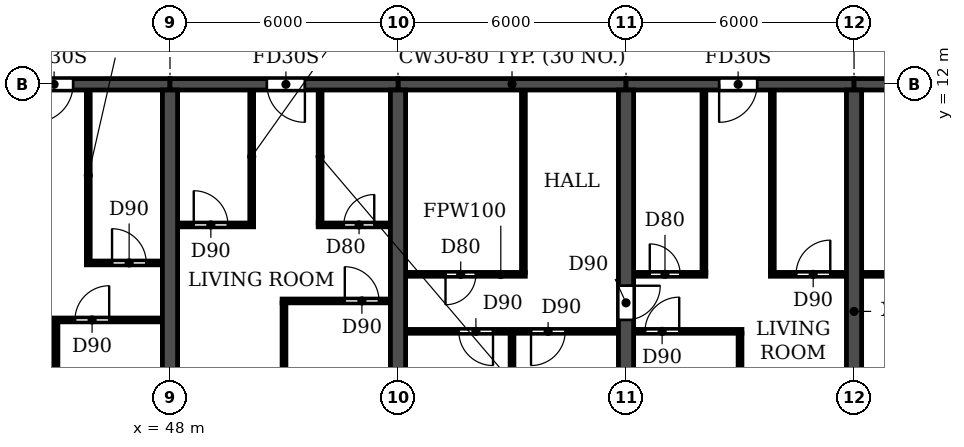
"""IFC4 building model, lengths in metres.
Left out: names, types, materials, properties, quantities, classifications, styles, units other than length and angle.
Written with IfcOpenShell. Run it as: python <this file> out.ifc"""

import sys

from ifc_helpers import new_model, si_unit, direction, frame, frame_2d, origin, place, context, subcontext, project, spatial, rectangle, extrude, element, fill, save


model = new_model("IFC4")
c1 = context("Model", 3, precision=1e-05, world=origin(), true_north=direction((0.0, 1.0)))
c2 = subcontext(c1, "Body", "Model", "MODEL_VIEW")
j1 = project(units=[si_unit("LENGTHUNIT", "METRE"), si_unit("PLANEANGLEUNIT", "RADIAN")], contexts=[c1])
p1 = place(None, origin())
s1 = spatial("IfcSite", under=j1, at=p1, CompositionType="ELEMENT")
p2 = place(p1, origin())
s2 = spatial("IfcBuilding", under=s1, at=p2, CompositionType="ELEMENT")
p3 = place(p2, frame((0.0, 0.0, 26.7)))
s3 = spatial("IfcBuildingStorey", under=s2, at=p3, CompositionType="ELEMENT", Elevation=26.7)
for number, where, z_axis, x_axis in (
    (1, (48.0, 0.2, 0.0), (0.0, 0.0, 1.0), (0.0, 1.0, 0.0)),
    (2, (54.0, 0.2, 0.0), (0.0, 0.0, 1.0), (0.0, 1.0, 0.0)),
):
    element("IfcWall", number, at=place(p3, frame(where, z_axis=z_axis, x_axis=x_axis)), inside=s3, PredefinedType="SHEAR", context=c2, shape_type="SweptSolid", body=[
        extrude(rectangle(XDim=11.65, YDim=0.4, at=frame_2d((5.825, 0.0))), origin(), (0.0, 0.0, 1.0), 3.05),
    ])
p4 = place(p3, frame((60.0, 0.2, 0.0), z_axis=(0.0, 0.0, 1.0), x_axis=(0.0, 1.0, 0.0)))
e3 = element("IfcWall", 3, at=p4, inside=s3, PredefinedType="SHEAR", context=c2, shape_type="SweptSolid", body=[
    extrude(rectangle(XDim=11.65, YDim=0.4, at=frame_2d((5.825, 0.0))), origin(), (0.0, 0.0, 1.0), 3.05),
])
p5 = place(p4, frame((5.6, 0.0, 0.0)))
e4 = element("IfcOpeningElement", 4, at=p5, cuts=e3, PredefinedType="OPENING", context=c2, shape_type="SweptSolid", body=[
    extrude(rectangle(XDim=0.9, YDim=2.1, at=frame_2d((0.45, 1.05))), frame((0.0, 0.21, 0.0), z_axis=(0.0, -1.0, 0.0), x_axis=(1.0, 0.0, 0.0)), (0.0, 0.0, 1.0), 0.42),
])
p6 = place(p3, frame((66.0, 0.2, 0.0), z_axis=(0.0, 0.0, 1.0), x_axis=(0.0, 1.0, 0.0)))
e5 = element("IfcWall", 5, at=p6, inside=s3, PredefinedType="SHEAR", context=c2, shape_type="SweptSolid", body=[
    extrude(rectangle(XDim=11.65, YDim=0.4, at=frame_2d((5.825, 0.0))), origin(), (0.0, 0.0, 1.0), 3.05),
])
p7 = place(p3, frame((42.0, 12.0, 0.0), z_axis=(0.0, 0.0, 1.0), x_axis=(1.0, 0.0, 0.0)))
e6 = element("IfcWall", 6, at=p7, inside=s3, PredefinedType="SHEAR", context=c2, shape_type="SweptSolid", body=[
    extrude(rectangle(XDim=6.0, YDim=0.3, at=frame_2d((3.0, 0.0))), origin(), (0.0, 0.0, 1.0), 2.45),
])
p8 = place(p7, frame((2.45, 0.0, 0.0)))
e7 = element("IfcOpeningElement", 7, at=p8, cuts=e6, PredefinedType="OPENING", context=c2, shape_type="SweptSolid", body=[
    extrude(rectangle(XDim=1.0, YDim=2.1, at=frame_2d((0.5, 1.05))), frame((0.0, 0.16, 0.0), z_axis=(0.0, -1.0, 0.0), x_axis=(1.0, 0.0, 0.0)), (0.0, 0.0, 1.0), 0.32),
])
p9 = place(p3, frame((48.0, 12.0, 0.0), z_axis=(0.0, 0.0, 1.0), x_axis=(1.0, 0.0, 0.0)))
e8 = element("IfcWall", 8, at=p9, inside=s3, PredefinedType="SHEAR", context=c2, shape_type="SweptSolid", body=[
    extrude(rectangle(XDim=6.0, YDim=0.3, at=frame_2d((3.0, 0.0))), origin(), (0.0, 0.0, 1.0), 2.45),
])
p10 = place(p9, frame((2.55, 0.0, 0.0)))
e9 = element("IfcOpeningElement", 9, at=p10, cuts=e8, PredefinedType="OPENING", context=c2, shape_type="SweptSolid", body=[
    extrude(rectangle(XDim=1.0, YDim=2.1, at=frame_2d((0.5, 1.05))), frame((0.0, 0.16, 0.0), z_axis=(0.0, -1.0, 0.0), x_axis=(1.0, 0.0, 0.0)), (0.0, 0.0, 1.0), 0.32),
])
p11 = place(p3, frame((54.0, 12.0, 0.0), z_axis=(0.0, 0.0, 1.0), x_axis=(1.0, 0.0, 0.0)))
e10 = element("IfcWall", 10, at=p11, inside=s3, PredefinedType="SHEAR", context=c2, shape_type="SweptSolid", body=[
    extrude(rectangle(XDim=6.0, YDim=0.3, at=frame_2d((3.0, 0.0))), origin(), (0.0, 0.0, 1.0), 2.45),
])
p12 = place(p3, frame((60.0, 12.0, 0.0), z_axis=(0.0, 0.0, 1.0), x_axis=(1.0, 0.0, 0.0)))
e11 = element("IfcWall", 11, at=p12, inside=s3, PredefinedType="SHEAR", context=c2, shape_type="SweptSolid", body=[
    extrude(rectangle(XDim=6.0, YDim=0.3, at=frame_2d((3.0, 0.0))), origin(), (0.0, 0.0, 1.0), 2.45),
])
p13 = place(p12, frame((2.45, 0.0, 0.0)))
e12 = element("IfcOpeningElement", 12, at=p13, cuts=e11, PredefinedType="OPENING", context=c2, shape_type="SweptSolid", body=[
    extrude(rectangle(XDim=1.0, YDim=2.1, at=frame_2d((0.5, 1.05))), frame((0.0, 0.16, 0.0), z_axis=(0.0, -1.0, 0.0), x_axis=(1.0, 0.0, 0.0)), (0.0, 0.0, 1.0), 0.32),
])
p14 = place(p3, frame((66.0, 12.0, 0.0), z_axis=(0.0, 0.0, 1.0), x_axis=(1.0, 0.0, 0.0)))
e13 = element("IfcWall", 13, at=p14, inside=s3, PredefinedType="SHEAR", context=c2, shape_type="SweptSolid", body=[
    extrude(rectangle(XDim=6.0, YDim=0.3, at=frame_2d((3.0, 0.0))), origin(), (0.0, 0.0, 1.0), 2.45),
])
p15 = place(p14, frame((2.45, 0.0, 0.0)))
e14 = element("IfcOpeningElement", 14, at=p15, cuts=e13, PredefinedType="OPENING", context=c2, shape_type="SweptSolid", body=[
    extrude(rectangle(XDim=1.0, YDim=2.1, at=frame_2d((0.5, 1.05))), frame((0.0, 0.16, 0.0), z_axis=(0.0, -1.0, 0.0), x_axis=(1.0, 0.0, 0.0)), (0.0, 0.0, 1.0), 0.32),
])
p16 = place(p3, frame((54.21, 5.5, 0.0), z_axis=(0.0, 0.0, 1.0), x_axis=(1.0, 0.0, 0.0)))
e15 = element("IfcWall", 15, at=p16, inside=s3, PredefinedType="PARTITIONING", context=c2, shape_type="SweptSolid", body=[
    extrude(rectangle(XDim=5.58, YDim=0.1, at=frame_2d((2.79, 0.0))), origin(), (0.0, 0.0, 1.0), 3.05),
])
p17 = place(p16, frame((1.39, 0.0, 0.0)))
e16 = element("IfcOpeningElement", 16, at=p17, cuts=e15, PredefinedType="OPENING", context=c2, shape_type="SweptSolid", body=[
    extrude(rectangle(XDim=0.9, YDim=2.1, at=frame_2d((0.45, 1.05))), frame((0.0, 0.06, 0.0), z_axis=(0.0, -1.0, 0.0), x_axis=(1.0, 0.0, 0.0)), (0.0, 0.0, 1.0), 0.12),
])
p18 = place(p16, frame((3.29, 0.0, 0.0)))
e17 = element("IfcOpeningElement", 17, at=p18, cuts=e15, PredefinedType="OPENING", context=c2, shape_type="SweptSolid", body=[
    extrude(rectangle(XDim=0.9, YDim=2.1, at=frame_2d((0.45, 1.05))), frame((0.0, 0.06, 0.0), z_axis=(0.0, -1.0, 0.0), x_axis=(1.0, 0.0, 0.0)), (0.0, 0.0, 1.0), 0.12),
])
p19 = place(p3, frame((60.21, 5.5, 0.0), z_axis=(0.0, 0.0, 1.0), x_axis=(1.0, 0.0, 0.0)))
e18 = element("IfcWall", 18, at=p19, inside=s3, PredefinedType="PARTITIONING", context=c2, shape_type="SweptSolid", body=[
    extrude(rectangle(XDim=2.84, YDim=0.1, at=frame_2d((1.42, 0.0))), origin(), (0.0, 0.0, 1.0), 3.05),
])
p20 = place(p19, frame((0.29, 0.0, 0.0)))
e19 = element("IfcOpeningElement", 19, at=p20, cuts=e18, PredefinedType="OPENING", context=c2, shape_type="SweptSolid", body=[
    extrude(rectangle(XDim=0.9, YDim=2.1, at=frame_2d((0.45, 1.05))), frame((0.0, 0.06, 0.0), z_axis=(0.0, -1.0, 0.0), x_axis=(1.0, 0.0, 0.0)), (0.0, 0.0, 1.0), 0.12),
])
p21 = place(p3, frame((44.95, 5.8, 0.0), z_axis=(0.0, 0.0, 1.0), x_axis=(1.0, 0.0, 0.0)))
e20 = element("IfcWall", 20, at=p21, inside=s3, PredefinedType="PARTITIONING", context=c2, shape_type="SweptSolid", body=[
    extrude(rectangle(XDim=2.84, YDim=0.1, at=frame_2d((1.42, 0.0))), origin(), (0.0, 0.0, 1.0), 3.05),
])
p22 = place(p21, frame((0.55, 0.0, 0.0)))
e21 = element("IfcOpeningElement", 21, at=p22, cuts=e20, PredefinedType="OPENING", context=c2, shape_type="SweptSolid", body=[
    extrude(rectangle(XDim=0.9, YDim=2.1, at=frame_2d((0.45, 1.05))), frame((0.0, 0.06, 0.0), z_axis=(0.0, -1.0, 0.0), x_axis=(1.0, 0.0, 0.0)), (0.0, 0.0, 1.0), 0.12),
])
p23 = place(p3, frame((50.95, 6.3, 0.0), z_axis=(0.0, 0.0, 1.0), x_axis=(1.0, 0.0, 0.0)))
e22 = element("IfcWall", 22, at=p23, inside=s3, PredefinedType="PARTITIONING", context=c2, shape_type="SweptSolid", body=[
    extrude(rectangle(XDim=2.84, YDim=0.1, at=frame_2d((1.42, 0.0))), origin(), (0.0, 0.0, 1.0), 3.05),
])
p24 = place(p23, frame((1.65, 0.0, 0.0)))
e23 = element("IfcOpeningElement", 23, at=p24, cuts=e22, PredefinedType="OPENING", context=c2, shape_type="SweptSolid", body=[
    extrude(rectangle(XDim=0.9, YDim=2.1, at=frame_2d((0.45, 1.05))), frame((0.0, 0.06, 0.0), z_axis=(0.0, -1.0, 0.0), x_axis=(1.0, 0.0, 0.0)), (0.0, 0.0, 1.0), 0.12),
])
p25 = place(p3, frame((54.21, 7.0, 0.0), z_axis=(0.0, 0.0, 1.0), x_axis=(1.0, 0.0, 0.0)))
e24 = element("IfcWall", 24, at=p25, inside=s3, PredefinedType="PARTITIONING", context=c2, shape_type="SweptSolid", body=[
    extrude(rectangle(XDim=3.14, YDim=0.1, at=frame_2d((1.57, 0.0))), origin(), (0.0, 0.0, 1.0), 3.05),
])
p26 = place(p25, frame((1.04, 0.0, 0.0)))
e25 = element("IfcOpeningElement", 25, at=p26, cuts=e24, PredefinedType="OPENING", context=c2, shape_type="SweptSolid", body=[
    extrude(rectangle(XDim=0.8, YDim=2.1, at=frame_2d((0.4, 1.05))), frame((0.0, 0.06, 0.0), z_axis=(0.0, -1.0, 0.0), x_axis=(1.0, 0.0, 0.0)), (0.0, 0.0, 1.0), 0.12),
])
p27 = place(p3, frame((60.21, 7.0, 0.0), z_axis=(0.0, 0.0, 1.0), x_axis=(1.0, 0.0, 0.0)))
e26 = element("IfcWall", 26, at=p27, inside=s3, PredefinedType="PARTITIONING", context=c2, shape_type="SweptSolid", body=[
    extrude(rectangle(XDim=1.89, YDim=0.1, at=frame_2d((0.945, 0.0))), origin(), (0.0, 0.0, 1.0), 3.05),
])
p28 = place(p27, frame((0.415, 0.0, 0.0)))
e27 = element("IfcOpeningElement", 27, at=p28, cuts=e26, PredefinedType="OPENING", context=c2, shape_type="SweptSolid", body=[
    extrude(rectangle(XDim=0.8, YDim=2.1, at=frame_2d((0.4, 1.05))), frame((0.0, 0.06, 0.0), z_axis=(0.0, -1.0, 0.0), x_axis=(1.0, 0.0, 0.0)), (0.0, 0.0, 1.0), 0.12),
])
p29 = place(p3, frame((63.8, 7.0, 0.0), z_axis=(0.0, 0.0, 1.0), x_axis=(1.0, 0.0, 0.0)))
e28 = element("IfcWall", 28, at=p29, inside=s3, PredefinedType="PARTITIONING", context=c2, shape_type="SweptSolid", body=[
    extrude(rectangle(XDim=1.99, YDim=0.1, at=frame_2d((0.995, 0.0))), origin(), (0.0, 0.0, 1.0), 3.05),
])
p30 = place(p29, frame((0.675, 0.0, 0.0)))
e29 = element("IfcOpeningElement", 29, at=p30, cuts=e28, PredefinedType="OPENING", context=c2, shape_type="SweptSolid", body=[
    extrude(rectangle(XDim=0.9, YDim=2.1, at=frame_2d((0.45, 1.05))), frame((0.0, 0.06, 0.0), z_axis=(0.0, -1.0, 0.0), x_axis=(1.0, 0.0, 0.0)), (0.0, 0.0, 1.0), 0.12),
])
p31 = place(p3, frame((66.21, 7.0, 0.0), z_axis=(0.0, 0.0, 1.0), x_axis=(1.0, 0.0, 0.0)))
e30 = element("IfcWall", 30, at=p31, inside=s3, PredefinedType="PARTITIONING", context=c2, shape_type="SweptSolid", body=[
    extrude(rectangle(XDim=1.89, YDim=0.1, at=frame_2d((0.945, 0.0))), origin(), (0.0, 0.0, 1.0), 3.05),
])
p32 = place(p3, frame((45.8, 7.3, 0.0), z_axis=(0.0, 0.0, 1.0), x_axis=(1.0, 0.0, 0.0)))
e31 = element("IfcWall", 31, at=p32, inside=s3, PredefinedType="PARTITIONING", context=c2, shape_type="SweptSolid", body=[
    extrude(rectangle(XDim=1.99, YDim=0.1, at=frame_2d((0.995, 0.0))), origin(), (0.0, 0.0, 1.0), 3.05),
])
p33 = place(p32, frame((0.675, 0.0, 0.0)))
e32 = element("IfcOpeningElement", 32, at=p33, cuts=e31, PredefinedType="OPENING", context=c2, shape_type="SweptSolid", body=[
    extrude(rectangle(XDim=0.9, YDim=2.1, at=frame_2d((0.45, 1.05))), frame((0.0, 0.06, 0.0), z_axis=(0.0, -1.0, 0.0), x_axis=(1.0, 0.0, 0.0)), (0.0, 0.0, 1.0), 0.12),
])
p34 = place(p3, frame((48.21, 8.3, 0.0), z_axis=(0.0, 0.0, 1.0), x_axis=(1.0, 0.0, 0.0)))
e33 = element("IfcWall", 33, at=p34, inside=s3, PredefinedType="PARTITIONING", context=c2, shape_type="SweptSolid", body=[
    extrude(rectangle(XDim=1.99, YDim=0.1, at=frame_2d((0.995, 0.0))), origin(), (0.0, 0.0, 1.0), 3.05),
])
p35 = place(p34, frame((0.415, 0.0, 0.0)))
e34 = element("IfcOpeningElement", 34, at=p35, cuts=e33, PredefinedType="OPENING", context=c2, shape_type="SweptSolid", body=[
    extrude(rectangle(XDim=0.9, YDim=2.1, at=frame_2d((0.45, 1.05))), frame((0.0, 0.06, 0.0), z_axis=(0.0, -1.0, 0.0), x_axis=(1.0, 0.0, 0.0)), (0.0, 0.0, 1.0), 0.12),
])
p36 = place(p3, frame((51.9, 8.3, 0.0), z_axis=(0.0, 0.0, 1.0), x_axis=(1.0, 0.0, 0.0)))
e35 = element("IfcWall", 35, at=p36, inside=s3, PredefinedType="PARTITIONING", context=c2, shape_type="SweptSolid", body=[
    extrude(rectangle(XDim=1.89, YDim=0.1, at=frame_2d((0.945, 0.0))), origin(), (0.0, 0.0, 1.0), 3.05),
])
p37 = place(p36, frame((0.675, 0.0, 0.0)))
e36 = element("IfcOpeningElement", 36, at=p37, cuts=e35, PredefinedType="OPENING", context=c2, shape_type="SweptSolid", body=[
    extrude(rectangle(XDim=0.8, YDim=2.1, at=frame_2d((0.4, 1.05))), frame((0.0, 0.06, 0.0), z_axis=(0.0, -1.0, 0.0), x_axis=(1.0, 0.0, 0.0)), (0.0, 0.0, 1.0), 0.12),
])
p38 = place(p3, frame((45.0, 0.06, 0.0), z_axis=(0.0, 0.0, 1.0), x_axis=(0.0, 1.0, 0.0)))
e37 = element("IfcWall", 37, at=p38, inside=s3, PredefinedType="PARTITIONING", context=c2, shape_type="SweptSolid", body=[
    extrude(rectangle(XDim=5.69, YDim=0.1, at=frame_2d((2.845, 0.0))), origin(), (0.0, 0.0, 1.0), 3.05),
])
p39 = place(p3, frame((45.85, 7.35, 0.0), z_axis=(0.0, 0.0, 1.0), x_axis=(0.0, 1.0, 0.0)))
e38 = element("IfcWall", 38, at=p39, inside=s3, PredefinedType="PARTITIONING", context=c2, shape_type="SweptSolid", body=[
    extrude(rectangle(XDim=4.49, YDim=0.1, at=frame_2d((2.245, 0.0))), origin(), (0.0, 0.0, 1.0), 3.05),
])
p40 = place(p3, frame((50.15, 8.35, 0.0), z_axis=(0.0, 0.0, 1.0), x_axis=(0.0, 1.0, 0.0)))
e39 = element("IfcWall", 39, at=p40, inside=s3, PredefinedType="PARTITIONING", context=c2, shape_type="SweptSolid", body=[
    extrude(rectangle(XDim=3.49, YDim=0.1, at=frame_2d((1.745, 0.0))), origin(), (0.0, 0.0, 1.0), 3.05),
])
p41 = place(p3, frame((51.0, 0.06, 0.0), z_axis=(0.0, 0.0, 1.0), x_axis=(0.0, 1.0, 0.0)))
e40 = element("IfcWall", 40, at=p41, inside=s3, PredefinedType="PARTITIONING", context=c2, shape_type="SweptSolid", body=[
    extrude(rectangle(XDim=6.19, YDim=0.1, at=frame_2d((3.095, 0.0))), origin(), (0.0, 0.0, 1.0), 3.05),
])
p42 = place(p3, frame((51.95, 8.35, 0.0), z_axis=(0.0, 0.0, 1.0), x_axis=(0.0, 1.0, 0.0)))
e41 = element("IfcWall", 41, at=p42, inside=s3, PredefinedType="PARTITIONING", context=c2, shape_type="SweptSolid", body=[
    extrude(rectangle(XDim=3.49, YDim=0.1, at=frame_2d((1.745, 0.0))), origin(), (0.0, 0.0, 1.0), 3.05),
])
p43 = place(p3, frame((57.0, 0.06, 0.0), z_axis=(0.0, 0.0, 1.0), x_axis=(0.0, 1.0, 0.0)))
e42 = element("IfcWall", 42, at=p43, inside=s3, PredefinedType="PARTITIONING", context=c2, shape_type="SweptSolid", body=[
    extrude(rectangle(XDim=5.39, YDim=0.1, at=frame_2d((2.695, 0.0))), origin(), (0.0, 0.0, 1.0), 3.05),
])
for number, where, z_axis, x_axis in (
    (43, (57.3, 7.05, 0.0), (0.0, 0.0, 1.0), (0.0, 1.0, 0.0)),
    (44, (62.05, 7.05, 0.0), (0.0, 0.0, 1.0), (0.0, 1.0, 0.0)),
):
    element("IfcWall", number, at=place(p3, frame(where, z_axis=z_axis, x_axis=x_axis)), inside=s3, PredefinedType="PARTITIONING", context=c2, shape_type="SweptSolid", body=[
        extrude(rectangle(XDim=4.79, YDim=0.1, at=frame_2d((2.395, 0.0))), origin(), (0.0, 0.0, 1.0), 3.05),
    ])
p44 = place(p3, frame((63.0, 0.06, 0.0), z_axis=(0.0, 0.0, 1.0), x_axis=(0.0, 1.0, 0.0)))
e45 = element("IfcWall", 45, at=p44, inside=s3, PredefinedType="PARTITIONING", context=c2, shape_type="SweptSolid", body=[
    extrude(rectangle(XDim=5.39, YDim=0.1, at=frame_2d((2.695, 0.0))), origin(), (0.0, 0.0, 1.0), 3.05),
])
p45 = place(p3, frame((63.85, 7.05, 0.0), z_axis=(0.0, 0.0, 1.0), x_axis=(0.0, 1.0, 0.0)))
e46 = element("IfcWall", 46, at=p45, inside=s3, PredefinedType="PARTITIONING", context=c2, shape_type="SweptSolid", body=[
    extrude(rectangle(XDim=4.79, YDim=0.1, at=frame_2d((2.395, 0.0))), origin(), (0.0, 0.0, 1.0), 3.05),
])
p46 = place(p8, frame((1.0, 0.0, 0.0), z_axis=(0.0, 0.0, 1.0), x_axis=(-1.0, 0.0, 0.0)))
e47 = element("IfcDoor", 47, at=p46, inside=s3, OperationType="SINGLE_SWING_RIGHT", PredefinedType="DOOR", context=c2, shape_type="SweptSolid", body=[
    extrude(rectangle(XDim=1.0, YDim=2.1, at=frame_2d((0.5, 1.05))), frame((0.0, 0.025, 0.0), z_axis=(0.0, -1.0, 0.0), x_axis=(1.0, 0.0, 0.0)), (0.0, 0.0, 1.0), 0.05),
])
fill(e7, e47)
p47 = place(p22, origin())
e48 = element("IfcDoor", 48, at=p47, inside=s3, OperationType="SINGLE_SWING_RIGHT", PredefinedType="DOOR", context=c2, shape_type="SweptSolid", body=[
    extrude(rectangle(XDim=0.9, YDim=2.1, at=frame_2d((0.45, 1.05))), frame((0.0, 0.025, 0.0), z_axis=(0.0, -1.0, 0.0), x_axis=(1.0, 0.0, 0.0)), (0.0, 0.0, 1.0), 0.05),
])
fill(e21, e48)
p48 = place(p33, origin())
e49 = element("IfcDoor", 49, at=p48, inside=s3, OperationType="SINGLE_SWING_LEFT", PredefinedType="DOOR", context=c2, shape_type="SweptSolid", body=[
    extrude(rectangle(XDim=0.9, YDim=2.1, at=frame_2d((0.45, 1.05))), frame((0.0, 0.025, 0.0), z_axis=(0.0, -1.0, 0.0), x_axis=(1.0, 0.0, 0.0)), (0.0, 0.0, 1.0), 0.05),
])
fill(e32, e49)
p49 = place(p35, origin())
e50 = element("IfcDoor", 50, at=p49, inside=s3, OperationType="SINGLE_SWING_LEFT", PredefinedType="DOOR", context=c2, shape_type="SweptSolid", body=[
    extrude(rectangle(XDim=0.9, YDim=2.1, at=frame_2d((0.45, 1.05))), frame((0.0, 0.025, 0.0), z_axis=(0.0, -1.0, 0.0), x_axis=(1.0, 0.0, 0.0)), (0.0, 0.0, 1.0), 0.05),
])
fill(e34, e50)
p50 = place(p10, frame((1.0, 0.0, 0.0), z_axis=(0.0, 0.0, 1.0), x_axis=(-1.0, 0.0, 0.0)))
e51 = element("IfcDoor", 51, at=p50, inside=s3, OperationType="SINGLE_SWING_LEFT", PredefinedType="DOOR", context=c2, shape_type="SweptSolid", body=[
    extrude(rectangle(XDim=1.0, YDim=2.1, at=frame_2d((0.5, 1.05))), frame((0.0, 0.025, 0.0), z_axis=(0.0, -1.0, 0.0), x_axis=(1.0, 0.0, 0.0)), (0.0, 0.0, 1.0), 0.05),
])
fill(e9, e51)
p51 = place(p37, origin())
e52 = element("IfcDoor", 52, at=p51, inside=s3, OperationType="SINGLE_SWING_RIGHT", PredefinedType="DOOR", context=c2, shape_type="SweptSolid", body=[
    extrude(rectangle(XDim=0.8, YDim=2.1, at=frame_2d((0.4, 1.05))), frame((0.0, 0.025, 0.0), z_axis=(0.0, -1.0, 0.0), x_axis=(1.0, 0.0, 0.0)), (0.0, 0.0, 1.0), 0.05),
])
fill(e36, e52)
p52 = place(p24, origin())
e53 = element("IfcDoor", 53, at=p52, inside=s3, OperationType="SINGLE_SWING_LEFT", PredefinedType="DOOR", context=c2, shape_type="SweptSolid", body=[
    extrude(rectangle(XDim=0.9, YDim=2.1, at=frame_2d((0.45, 1.05))), frame((0.0, 0.025, 0.0), z_axis=(0.0, -1.0, 0.0), x_axis=(1.0, 0.0, 0.0)), (0.0, 0.0, 1.0), 0.05),
])
fill(e23, e53)
p53 = place(p26, frame((0.8, 0.0, 0.0), z_axis=(0.0, 0.0, 1.0), x_axis=(-1.0, 0.0, 0.0)))
e54 = element("IfcDoor", 54, at=p53, inside=s3, OperationType="SINGLE_SWING_RIGHT", PredefinedType="DOOR", context=c2, shape_type="SweptSolid", body=[
    extrude(rectangle(XDim=0.8, YDim=2.1, at=frame_2d((0.4, 1.05))), frame((0.0, 0.025, 0.0), z_axis=(0.0, -1.0, 0.0), x_axis=(1.0, 0.0, 0.0)), (0.0, 0.0, 1.0), 0.05),
])
fill(e25, e54)
p54 = place(p17, frame((0.9, 0.0, 0.0), z_axis=(0.0, 0.0, 1.0), x_axis=(-1.0, 0.0, 0.0)))
e55 = element("IfcDoor", 55, at=p54, inside=s3, OperationType="SINGLE_SWING_LEFT", PredefinedType="DOOR", context=c2, shape_type="SweptSolid", body=[
    extrude(rectangle(XDim=0.9, YDim=2.1, at=frame_2d((0.45, 1.05))), frame((0.0, 0.025, 0.0), z_axis=(0.0, -1.0, 0.0), x_axis=(1.0, 0.0, 0.0)), (0.0, 0.0, 1.0), 0.05),
])
fill(e16, e55)
p55 = place(p18, frame((0.9, 0.0, 0.0), z_axis=(0.0, 0.0, 1.0), x_axis=(-1.0, 0.0, 0.0)))
e56 = element("IfcDoor", 56, at=p55, inside=s3, OperationType="SINGLE_SWING_RIGHT", PredefinedType="DOOR", context=c2, shape_type="SweptSolid", body=[
    extrude(rectangle(XDim=0.9, YDim=2.1, at=frame_2d((0.45, 1.05))), frame((0.0, 0.025, 0.0), z_axis=(0.0, -1.0, 0.0), x_axis=(1.0, 0.0, 0.0)), (0.0, 0.0, 1.0), 0.05),
])
fill(e17, e56)
p56 = place(p5, frame((0.9, 0.0, 0.0), z_axis=(0.0, 0.0, 1.0), x_axis=(-1.0, 0.0, 0.0)))
e57 = element("IfcDoor", 57, at=p56, inside=s3, OperationType="SINGLE_SWING_LEFT", PredefinedType="DOOR", context=c2, shape_type="SweptSolid", body=[
    extrude(rectangle(XDim=0.9, YDim=2.1, at=frame_2d((0.45, 1.05))), frame((0.0, 0.025, 0.0), z_axis=(0.0, -1.0, 0.0), x_axis=(1.0, 0.0, 0.0)), (0.0, 0.0, 1.0), 0.05),
])
fill(e4, e57)
p57 = place(p20, origin())
e58 = element("IfcDoor", 58, at=p57, inside=s3, OperationType="SINGLE_SWING_RIGHT", PredefinedType="DOOR", context=c2, shape_type="SweptSolid", body=[
    extrude(rectangle(XDim=0.9, YDim=2.1, at=frame_2d((0.45, 1.05))), frame((0.0, 0.025, 0.0), z_axis=(0.0, -1.0, 0.0), x_axis=(1.0, 0.0, 0.0)), (0.0, 0.0, 1.0), 0.05),
])
fill(e19, e58)
p58 = place(p28, origin())
e59 = element("IfcDoor", 59, at=p58, inside=s3, OperationType="SINGLE_SWING_LEFT", PredefinedType="DOOR", context=c2, shape_type="SweptSolid", body=[
    extrude(rectangle(XDim=0.8, YDim=2.1, at=frame_2d((0.4, 1.05))), frame((0.0, 0.025, 0.0), z_axis=(0.0, -1.0, 0.0), x_axis=(1.0, 0.0, 0.0)), (0.0, 0.0, 1.0), 0.05),
])
fill(e27, e59)
p59 = place(p13, frame((1.0, 0.0, 0.0), z_axis=(0.0, 0.0, 1.0), x_axis=(-1.0, 0.0, 0.0)))
e60 = element("IfcDoor", 60, at=p59, inside=s3, OperationType="SINGLE_SWING_RIGHT", PredefinedType="DOOR", context=c2, shape_type="SweptSolid", body=[
    extrude(rectangle(XDim=1.0, YDim=2.1, at=frame_2d((0.5, 1.05))), frame((0.0, 0.025, 0.0), z_axis=(0.0, -1.0, 0.0), x_axis=(1.0, 0.0, 0.0)), (0.0, 0.0, 1.0), 0.05),
])
fill(e12, e60)
p60 = place(p30, origin())
e61 = element("IfcDoor", 61, at=p60, inside=s3, OperationType="SINGLE_SWING_RIGHT", PredefinedType="DOOR", context=c2, shape_type="SweptSolid", body=[
    extrude(rectangle(XDim=0.9, YDim=2.1, at=frame_2d((0.45, 1.05))), frame((0.0, 0.025, 0.0), z_axis=(0.0, -1.0, 0.0), x_axis=(1.0, 0.0, 0.0)), (0.0, 0.0, 1.0), 0.05),
])
fill(e29, e61)
save(model, sys.argv[1])
